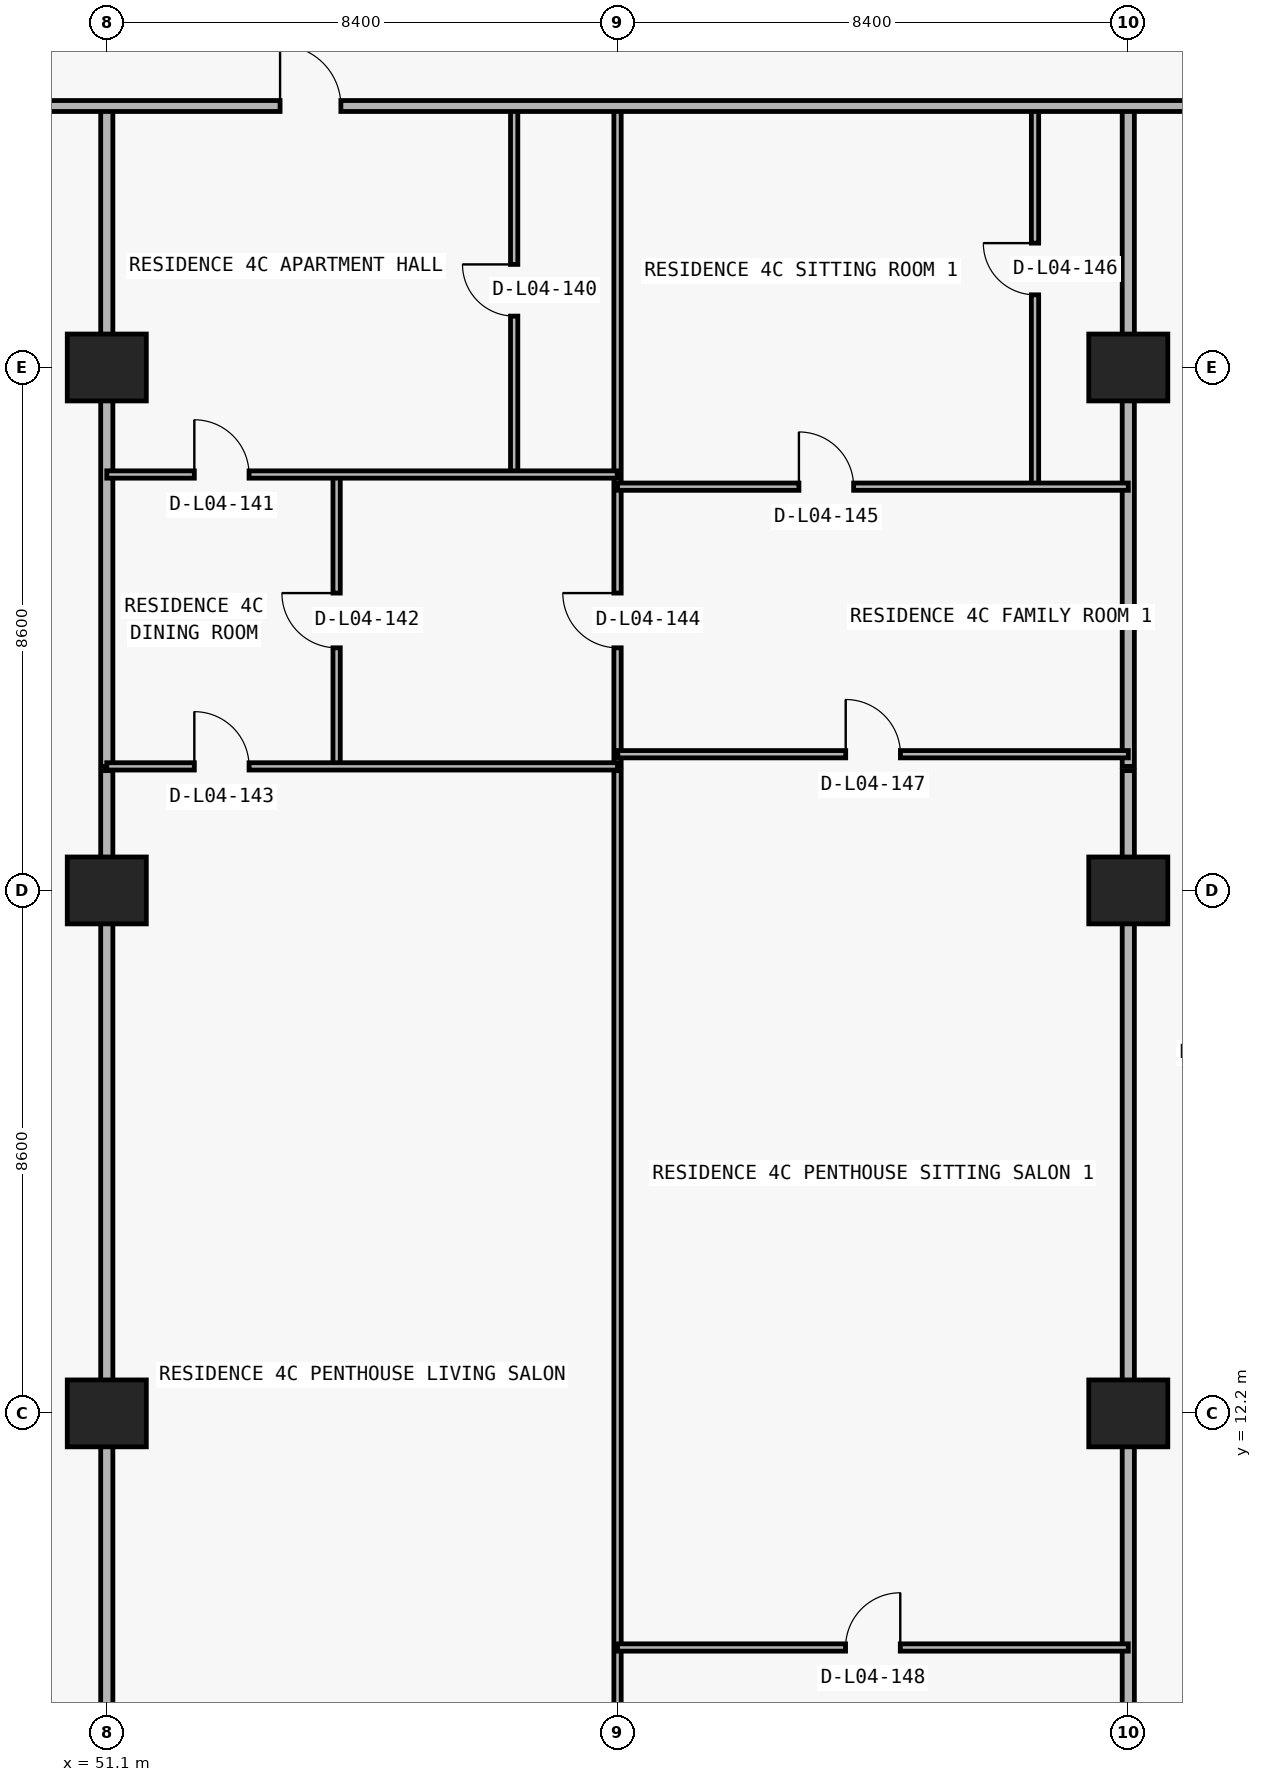
"""IFC4 building model, lengths in metres.
Left out: names, types, materials, properties, quantities, classifications, styles, units other than length and angle.
Written with IfcOpenShell. Run it as: python <this file> out.ifc"""

import sys

from ifc_helpers import new_model, si_unit, direction, frame, frame_2d, origin, origin_2d, place, context, subcontext, project, spatial, rectangle, extrude, element, fill, save


model = new_model("IFC4")
c1 = context("Model", 3, precision=1e-05, world=origin(), true_north=direction((0.0, 1.0)))
c2 = subcontext(c1, "Body", "Model", "MODEL_VIEW")
j1 = project(units=[si_unit("LENGTHUNIT", "METRE"), si_unit("PLANEANGLEUNIT", "RADIAN")], contexts=[c1])
p1 = place(None, origin())
s1 = spatial("IfcSite", under=j1, at=p1, CompositionType="ELEMENT")
p2 = place(p1, origin())
s2 = spatial("IfcBuilding", under=s1, at=p2, CompositionType="ELEMENT")
p3 = place(p2, frame((0.0, 0.0, 19.8)))
s3 = spatial("IfcBuildingStorey", under=s2, at=p3, CompositionType="ELEMENT", Elevation=19.8)
for number, where, z_axis, x_axis in (
    (1, (51.1, 12.2, 0.0), (0.0, 0.0, 1.0), (1.0, 0.0, 0.0)),
    (2, (67.9, 12.2, 0.0), (0.0, 0.0, 1.0), (1.0, 0.0, 0.0)),
    (3, (51.1, 20.8, 0.0), (0.0, 0.0, 1.0), (1.0, 0.0, 0.0)),
    (4, (67.9, 20.8, 0.0), (0.0, 0.0, 1.0), (1.0, 0.0, 0.0)),
    (5, (51.1, 29.4, 0.0), (0.0, 0.0, 1.0), (1.0, 0.0, 0.0)),
    (6, (67.9, 29.4, 0.0), (0.0, 0.0, 1.0), (1.0, 0.0, 0.0)),
):
    element("IfcColumn", number, at=place(p3, frame(where, z_axis=z_axis, x_axis=x_axis)), inside=s3, PredefinedType="COLUMN", context=c2, shape_type="SweptSolid", body=[
        extrude(rectangle(XDim=1.3, YDim=1.1, at=origin_2d()), origin(), (0.0, 0.0, 1.0), 4.45),
    ])
p4 = place(p3, frame((51.1, 2.695, 0.0), z_axis=(0.0, 0.0, 1.0), x_axis=(0.0, 1.0, 0.0)))
e7 = element("IfcWall", 7, at=p4, inside=s3, PredefinedType="PARTITIONING", context=c2, shape_type="SweptSolid", body=[
    extrude(rectangle(XDim=20.075, YDim=0.2, at=frame_2d((10.038, 0.0))), origin(), (0.0, 0.0, 1.0), 3.414),
])
p5 = place(p3, frame((51.1, 22.84, 0.0), z_axis=(0.0, 0.0, 1.0), x_axis=(0.0, 1.0, 0.0)))
e8 = element("IfcWall", 8, at=p5, inside=s3, PredefinedType="PARTITIONING", context=c2, shape_type="SweptSolid", body=[
    extrude(rectangle(XDim=10.86, YDim=0.2, at=frame_2d((5.43, 0.0))), origin(), (0.0, 0.0, 1.0), 3.414),
])
p6 = place(p3, frame((54.88, 22.84, 0.0), z_axis=(0.0, 0.0, 1.0), x_axis=(0.0, 1.0, 0.0)))
e9 = element("IfcWall", 9, at=p6, inside=s3, PredefinedType="PARTITIONING", context=c2, shape_type="SweptSolid", body=[
    extrude(rectangle(XDim=4.8, YDim=0.12, at=frame_2d((2.4, 0.0))), origin(), (0.0, 0.0, 1.0), 4.45),
])
p7 = place(p6, frame((1.95, 0.0, 0.0)))
e10 = element("IfcOpeningElement", 10, at=p7, cuts=e9, PredefinedType="OPENING", context=c2, shape_type="SweptSolid", body=[
    extrude(rectangle(XDim=0.9, YDim=2.15, at=frame_2d((0.45, 1.075))), frame((0.0, 0.07, 0.0), z_axis=(0.0, -1.0, 0.0), x_axis=(1.0, 0.0, 0.0)), (0.0, 0.0, 1.0), 0.14),
])
p8 = place(p3, frame((57.8, 27.64, 0.0), z_axis=(0.0, 0.0, 1.0), x_axis=(0.0, 1.0, 0.0)))
e11 = element("IfcWall", 11, at=p8, inside=s3, PredefinedType="PARTITIONING", context=c2, shape_type="SweptSolid", body=[
    extrude(rectangle(XDim=6.06, YDim=0.12, at=frame_2d((3.03, 0.0))), origin(), (0.0, 0.0, 1.0), 3.823),
])
p9 = place(p8, frame((2.605, 0.0, 0.0)))
e12 = element("IfcOpeningElement", 12, at=p9, cuts=e11, PredefinedType="OPENING", context=c2, shape_type="SweptSolid", body=[
    extrude(rectangle(XDim=0.85, YDim=2.1, at=frame_2d((0.425, 1.05))), frame((0.0, 0.07, 0.0), z_axis=(0.0, -1.0, 0.0), x_axis=(1.0, 0.0, 0.0)), (0.0, 0.0, 1.0), 0.14),
])
p10 = place(p3, frame((59.5, 2.695, 0.0), z_axis=(0.0, 0.0, 1.0), x_axis=(0.0, 1.0, 0.0)))
e13 = element("IfcWall", 13, at=p10, inside=s3, PredefinedType="PARTITIONING", context=c2, shape_type="SweptSolid", body=[
    extrude(rectangle(XDim=20.075, YDim=0.12, at=frame_2d((10.038, 0.0))), origin(), (0.0, 0.0, 1.0), 4.45),
])
p11 = place(p3, frame((59.5, 22.84, 0.0), z_axis=(0.0, 0.0, 1.0), x_axis=(0.0, 1.0, 0.0)))
e14 = element("IfcWall", 14, at=p11, inside=s3, PredefinedType="PARTITIONING", context=c2, shape_type="SweptSolid", body=[
    extrude(rectangle(XDim=10.86, YDim=0.12, at=frame_2d((5.43, 0.0))), origin(), (0.0, 0.0, 1.0), 4.45),
])
p12 = place(p11, frame((1.95, 0.0, 0.0)))
e15 = element("IfcOpeningElement", 15, at=p12, cuts=e14, PredefinedType="OPENING", context=c2, shape_type="SweptSolid", body=[
    extrude(rectangle(XDim=0.9, YDim=2.15, at=frame_2d((0.45, 1.075))), frame((0.0, 0.07, 0.0), z_axis=(0.0, -1.0, 0.0), x_axis=(1.0, 0.0, 0.0)), (0.0, 0.0, 1.0), 0.14),
])
p13 = place(p3, frame((66.366, 27.44, 0.0), z_axis=(0.0, 0.0, 1.0), x_axis=(0.0, 1.0, 0.0)))
e16 = element("IfcWall", 16, at=p13, inside=s3, PredefinedType="PARTITIONING", context=c2, shape_type="SweptSolid", body=[
    extrude(rectangle(XDim=6.26, YDim=0.12, at=frame_2d((3.13, 0.0))), origin(), (0.0, 0.0, 1.0), 4.45),
])
p14 = place(p13, frame((3.155, 0.0, 0.0)))
e17 = element("IfcOpeningElement", 17, at=p14, cuts=e16, PredefinedType="OPENING", context=c2, shape_type="SweptSolid", body=[
    extrude(rectangle(XDim=0.85, YDim=2.1, at=frame_2d((0.425, 1.05))), frame((0.0, 0.07, 0.0), z_axis=(0.0, -1.0, 0.0), x_axis=(1.0, 0.0, 0.0)), (0.0, 0.0, 1.0), 0.14),
])
p15 = place(p3, frame((67.9, 2.695, 0.0), z_axis=(0.0, 0.0, 1.0), x_axis=(0.0, 1.0, 0.0)))
e18 = element("IfcWall", 18, at=p15, inside=s3, PredefinedType="PARTITIONING", context=c2, shape_type="SweptSolid", body=[
    extrude(rectangle(XDim=20.075, YDim=0.2, at=frame_2d((10.038, 0.0))), origin(), (0.0, 0.0, 1.0), 3.414),
])
p16 = place(p3, frame((67.9, 22.84, 0.0), z_axis=(0.0, 0.0, 1.0), x_axis=(0.0, 1.0, 0.0)))
e19 = element("IfcWall", 19, at=p16, inside=s3, PredefinedType="PARTITIONING", context=c2, shape_type="SweptSolid", body=[
    extrude(rectangle(XDim=10.86, YDim=0.2, at=frame_2d((5.43, 0.0))), origin(), (0.0, 0.0, 1.0), 3.414),
])
p17 = place(p3, frame((59.5, 8.35, 0.0), z_axis=(0.0, 0.0, 1.0), x_axis=(1.0, 0.0, 0.0)))
e20 = element("IfcWall", 20, at=p17, inside=s3, PredefinedType="PARTITIONING", context=c2, shape_type="SweptSolid", body=[
    extrude(rectangle(XDim=8.4, YDim=0.12, at=frame_2d((4.2, 0.0))), origin(), (0.0, 0.0, 1.0), 4.45),
])
p18 = place(p17, frame((3.75, 0.0, 0.0)))
e21 = element("IfcOpeningElement", 21, at=p18, cuts=e20, PredefinedType="OPENING", context=c2, shape_type="SweptSolid", body=[
    extrude(rectangle(XDim=0.9, YDim=2.15, at=frame_2d((0.45, 1.075))), frame((0.0, 0.07, 0.0), z_axis=(0.0, -1.0, 0.0), x_axis=(1.0, 0.0, 0.0)), (0.0, 0.0, 1.0), 0.14),
])
p19 = place(p3, frame((51.1, 22.84, 0.0), z_axis=(0.0, 0.0, 1.0), x_axis=(1.0, 0.0, 0.0)))
e22 = element("IfcWall", 22, at=p19, inside=s3, PredefinedType="PARTITIONING", context=c2, shape_type="SweptSolid", body=[
    extrude(rectangle(XDim=8.4, YDim=0.12, at=frame_2d((4.2, 0.0))), origin(), (0.0, 0.0, 1.0), 4.45),
])
p20 = place(p19, frame((1.44, 0.0, 0.0)))
e23 = element("IfcOpeningElement", 23, at=p20, cuts=e22, PredefinedType="OPENING", context=c2, shape_type="SweptSolid", body=[
    extrude(rectangle(XDim=0.9, YDim=2.15, at=frame_2d((0.45, 1.075))), frame((0.0, 0.07, 0.0), z_axis=(0.0, -1.0, 0.0), x_axis=(1.0, 0.0, 0.0)), (0.0, 0.0, 1.0), 0.14),
])
p21 = place(p3, frame((59.505, 23.04, 0.0), z_axis=(0.0, 0.0, 1.0), x_axis=(1.0, 0.0, 0.0)))
e24 = element("IfcWall", 24, at=p21, inside=s3, PredefinedType="PARTITIONING", context=c2, shape_type="SweptSolid", body=[
    extrude(rectangle(XDim=8.395, YDim=0.12, at=frame_2d((4.198, 0.0))), origin(), (0.0, 0.0, 1.0), 4.45),
])
p22 = place(p21, frame((3.748, 0.0, 0.0)))
e25 = element("IfcOpeningElement", 25, at=p22, cuts=e24, PredefinedType="OPENING", context=c2, shape_type="SweptSolid", body=[
    extrude(rectangle(XDim=0.9, YDim=2.15, at=frame_2d((0.45, 1.075))), frame((0.0, 0.07, 0.0), z_axis=(0.0, -1.0, 0.0), x_axis=(1.0, 0.0, 0.0)), (0.0, 0.0, 1.0), 0.14),
])
p23 = place(p3, frame((59.5, 27.44, 0.0), z_axis=(0.0, 0.0, 1.0), x_axis=(1.0, 0.0, 0.0)))
e26 = element("IfcWall", 26, at=p23, inside=s3, PredefinedType="PARTITIONING", context=c2, shape_type="SweptSolid", body=[
    extrude(rectangle(XDim=8.4, YDim=0.12, at=frame_2d((4.2, 0.0))), origin(), (0.0, 0.0, 1.0), 4.45),
])
p24 = place(p23, frame((2.983, 0.0, 0.0)))
e27 = element("IfcOpeningElement", 27, at=p24, cuts=e26, PredefinedType="OPENING", context=c2, shape_type="SweptSolid", body=[
    extrude(rectangle(XDim=0.9, YDim=2.15, at=frame_2d((0.45, 1.075))), frame((0.0, 0.07, 0.0), z_axis=(0.0, -1.0, 0.0), x_axis=(1.0, 0.0, 0.0)), (0.0, 0.0, 1.0), 0.14),
])
p25 = place(p3, frame((51.1, 27.64, 0.0), z_axis=(0.0, 0.0, 1.0), x_axis=(1.0, 0.0, 0.0)))
e28 = element("IfcWall", 28, at=p25, inside=s3, PredefinedType="PARTITIONING", context=c2, shape_type="SweptSolid", body=[
    extrude(rectangle(XDim=8.395, YDim=0.12, at=frame_2d((4.198, 0.0))), origin(), (0.0, 0.0, 1.0), 4.45),
])
p26 = place(p25, frame((1.44, 0.0, 0.0)))
e29 = element("IfcOpeningElement", 29, at=p26, cuts=e28, PredefinedType="OPENING", context=c2, shape_type="SweptSolid", body=[
    extrude(rectangle(XDim=0.9, YDim=2.15, at=frame_2d((0.45, 1.075))), frame((0.0, 0.07, 0.0), z_axis=(0.0, -1.0, 0.0), x_axis=(1.0, 0.0, 0.0)), (0.0, 0.0, 1.0), 0.14),
])
p27 = place(p3, frame((26.7, 33.7, 0.0), z_axis=(0.0, 0.0, 1.0), x_axis=(1.0, 0.0, 0.0)))
e30 = element("IfcWall", 30, at=p27, inside=s3, PredefinedType="PARTITIONING", context=c2, shape_type="SweptSolid", body=[
    extrude(rectangle(XDim=47.45, YDim=0.18, at=frame_2d((23.725, 0.0))), origin(), (0.0, 0.0, 1.0), 4.45),
])
p28 = place(p27, frame((11.675, 0.0, 0.0)))
e31 = element("IfcOpeningElement", 31, at=p28, cuts=e30, PredefinedType="OPENING", context=c2, shape_type="SweptSolid", body=[
    extrude(rectangle(XDim=1.05, YDim=2.15, at=frame_2d((0.525, 1.075))), frame((0.0, 0.1, 0.0), z_axis=(0.0, -1.0, 0.0), x_axis=(1.0, 0.0, 0.0)), (0.0, 0.0, 1.0), 0.2),
])
p29 = place(p27, frame((27.25, 0.0, 0.0)))
e32 = element("IfcOpeningElement", 32, at=p29, cuts=e30, PredefinedType="OPENING", context=c2, shape_type="SweptSolid", body=[
    extrude(rectangle(XDim=1.0, YDim=2.2, at=frame_2d((0.5, 1.1))), frame((0.0, 0.1, 0.0), z_axis=(0.0, -1.0, 0.0), x_axis=(1.0, 0.0, 0.0)), (0.0, 0.0, 1.0), 0.2),
])
p30 = place(p27, frame((43.8, 0.0, 0.0)))
e33 = element("IfcOpeningElement", 33, at=p30, cuts=e30, PredefinedType="OPENING", context=c2, shape_type="SweptSolid", body=[
    extrude(rectangle(XDim=1.05, YDim=2.15, at=frame_2d((0.525, 1.075))), frame((0.0, 0.1, 0.0), z_axis=(0.0, -1.0, 0.0), x_axis=(1.0, 0.0, 0.0)), (0.0, 0.0, 1.0), 0.2),
])
p31 = place(p29, origin())
e34 = element("IfcDoor", 34, at=p31, inside=s3, OperationType="SINGLE_SWING_LEFT", PredefinedType="DOOR", context=c2, shape_type="SweptSolid", body=[
    extrude(rectangle(XDim=1.0, YDim=2.2, at=frame_2d((0.5, 1.1))), frame((0.0, 0.025, 0.0), z_axis=(0.0, -1.0, 0.0), x_axis=(1.0, 0.0, 0.0)), (0.0, 0.0, 1.0), 0.05),
])
fill(e32, e34)
p32 = place(p9, origin())
e35 = element("IfcDoor", 35, at=p32, inside=s3, OperationType="SINGLE_SWING_RIGHT", PredefinedType="DOOR", context=c2, shape_type="SweptSolid", body=[
    extrude(rectangle(XDim=0.85, YDim=2.1, at=frame_2d((0.425, 1.05))), frame((0.0, 0.025, 0.0), z_axis=(0.0, -1.0, 0.0), x_axis=(1.0, 0.0, 0.0)), (0.0, 0.0, 1.0), 0.05),
])
fill(e12, e35)
p33 = place(p26, origin())
e36 = element("IfcDoor", 36, at=p33, inside=s3, OperationType="SINGLE_SWING_LEFT", PredefinedType="DOOR", context=c2, shape_type="SweptSolid", body=[
    extrude(rectangle(XDim=0.9, YDim=2.15, at=frame_2d((0.45, 1.075))), frame((0.0, 0.025, 0.0), z_axis=(0.0, -1.0, 0.0), x_axis=(1.0, 0.0, 0.0)), (0.0, 0.0, 1.0), 0.05),
])
fill(e29, e36)
p34 = place(p7, origin())
e37 = element("IfcDoor", 37, at=p34, inside=s3, OperationType="SINGLE_SWING_RIGHT", PredefinedType="DOOR", context=c2, shape_type="SweptSolid", body=[
    extrude(rectangle(XDim=0.9, YDim=2.15, at=frame_2d((0.45, 1.075))), frame((0.0, 0.025, 0.0), z_axis=(0.0, -1.0, 0.0), x_axis=(1.0, 0.0, 0.0)), (0.0, 0.0, 1.0), 0.05),
])
fill(e10, e37)
p35 = place(p20, origin())
e38 = element("IfcDoor", 38, at=p35, inside=s3, OperationType="SINGLE_SWING_LEFT", PredefinedType="DOOR", context=c2, shape_type="SweptSolid", body=[
    extrude(rectangle(XDim=0.9, YDim=2.15, at=frame_2d((0.45, 1.075))), frame((0.0, 0.025, 0.0), z_axis=(0.0, -1.0, 0.0), x_axis=(1.0, 0.0, 0.0)), (0.0, 0.0, 1.0), 0.05),
])
fill(e23, e38)
p36 = place(p12, origin())
e39 = element("IfcDoor", 39, at=p36, inside=s3, OperationType="SINGLE_SWING_RIGHT", PredefinedType="DOOR", context=c2, shape_type="SweptSolid", body=[
    extrude(rectangle(XDim=0.9, YDim=2.15, at=frame_2d((0.45, 1.075))), frame((0.0, 0.025, 0.0), z_axis=(0.0, -1.0, 0.0), x_axis=(1.0, 0.0, 0.0)), (0.0, 0.0, 1.0), 0.05),
])
fill(e15, e39)
p37 = place(p24, origin())
e40 = element("IfcDoor", 40, at=p37, inside=s3, OperationType="SINGLE_SWING_LEFT", PredefinedType="DOOR", context=c2, shape_type="SweptSolid", body=[
    extrude(rectangle(XDim=0.9, YDim=2.15, at=frame_2d((0.45, 1.075))), frame((0.0, 0.025, 0.0), z_axis=(0.0, -1.0, 0.0), x_axis=(1.0, 0.0, 0.0)), (0.0, 0.0, 1.0), 0.05),
])
fill(e27, e40)
p38 = place(p14, origin())
e41 = element("IfcDoor", 41, at=p38, inside=s3, OperationType="SINGLE_SWING_RIGHT", PredefinedType="DOOR", context=c2, shape_type="SweptSolid", body=[
    extrude(rectangle(XDim=0.85, YDim=2.1, at=frame_2d((0.425, 1.05))), frame((0.0, 0.025, 0.0), z_axis=(0.0, -1.0, 0.0), x_axis=(1.0, 0.0, 0.0)), (0.0, 0.0, 1.0), 0.05),
])
fill(e17, e41)
p39 = place(p22, origin())
e42 = element("IfcDoor", 42, at=p39, inside=s3, OperationType="SINGLE_SWING_LEFT", PredefinedType="DOOR", context=c2, shape_type="SweptSolid", body=[
    extrude(rectangle(XDim=0.9, YDim=2.15, at=frame_2d((0.45, 1.075))), frame((0.0, 0.025, 0.0), z_axis=(0.0, -1.0, 0.0), x_axis=(1.0, 0.0, 0.0)), (0.0, 0.0, 1.0), 0.05),
])
fill(e25, e42)
p40 = place(p18, origin())
e43 = element("IfcDoor", 43, at=p40, inside=s3, OperationType="SINGLE_SWING_RIGHT", PredefinedType="DOOR", context=c2, shape_type="SweptSolid", body=[
    extrude(rectangle(XDim=0.9, YDim=2.15, at=frame_2d((0.45, 1.075))), frame((0.0, 0.025, 0.0), z_axis=(0.0, -1.0, 0.0), x_axis=(1.0, 0.0, 0.0)), (0.0, 0.0, 1.0), 0.05),
])
fill(e21, e43)
save(model, sys.argv[1])
